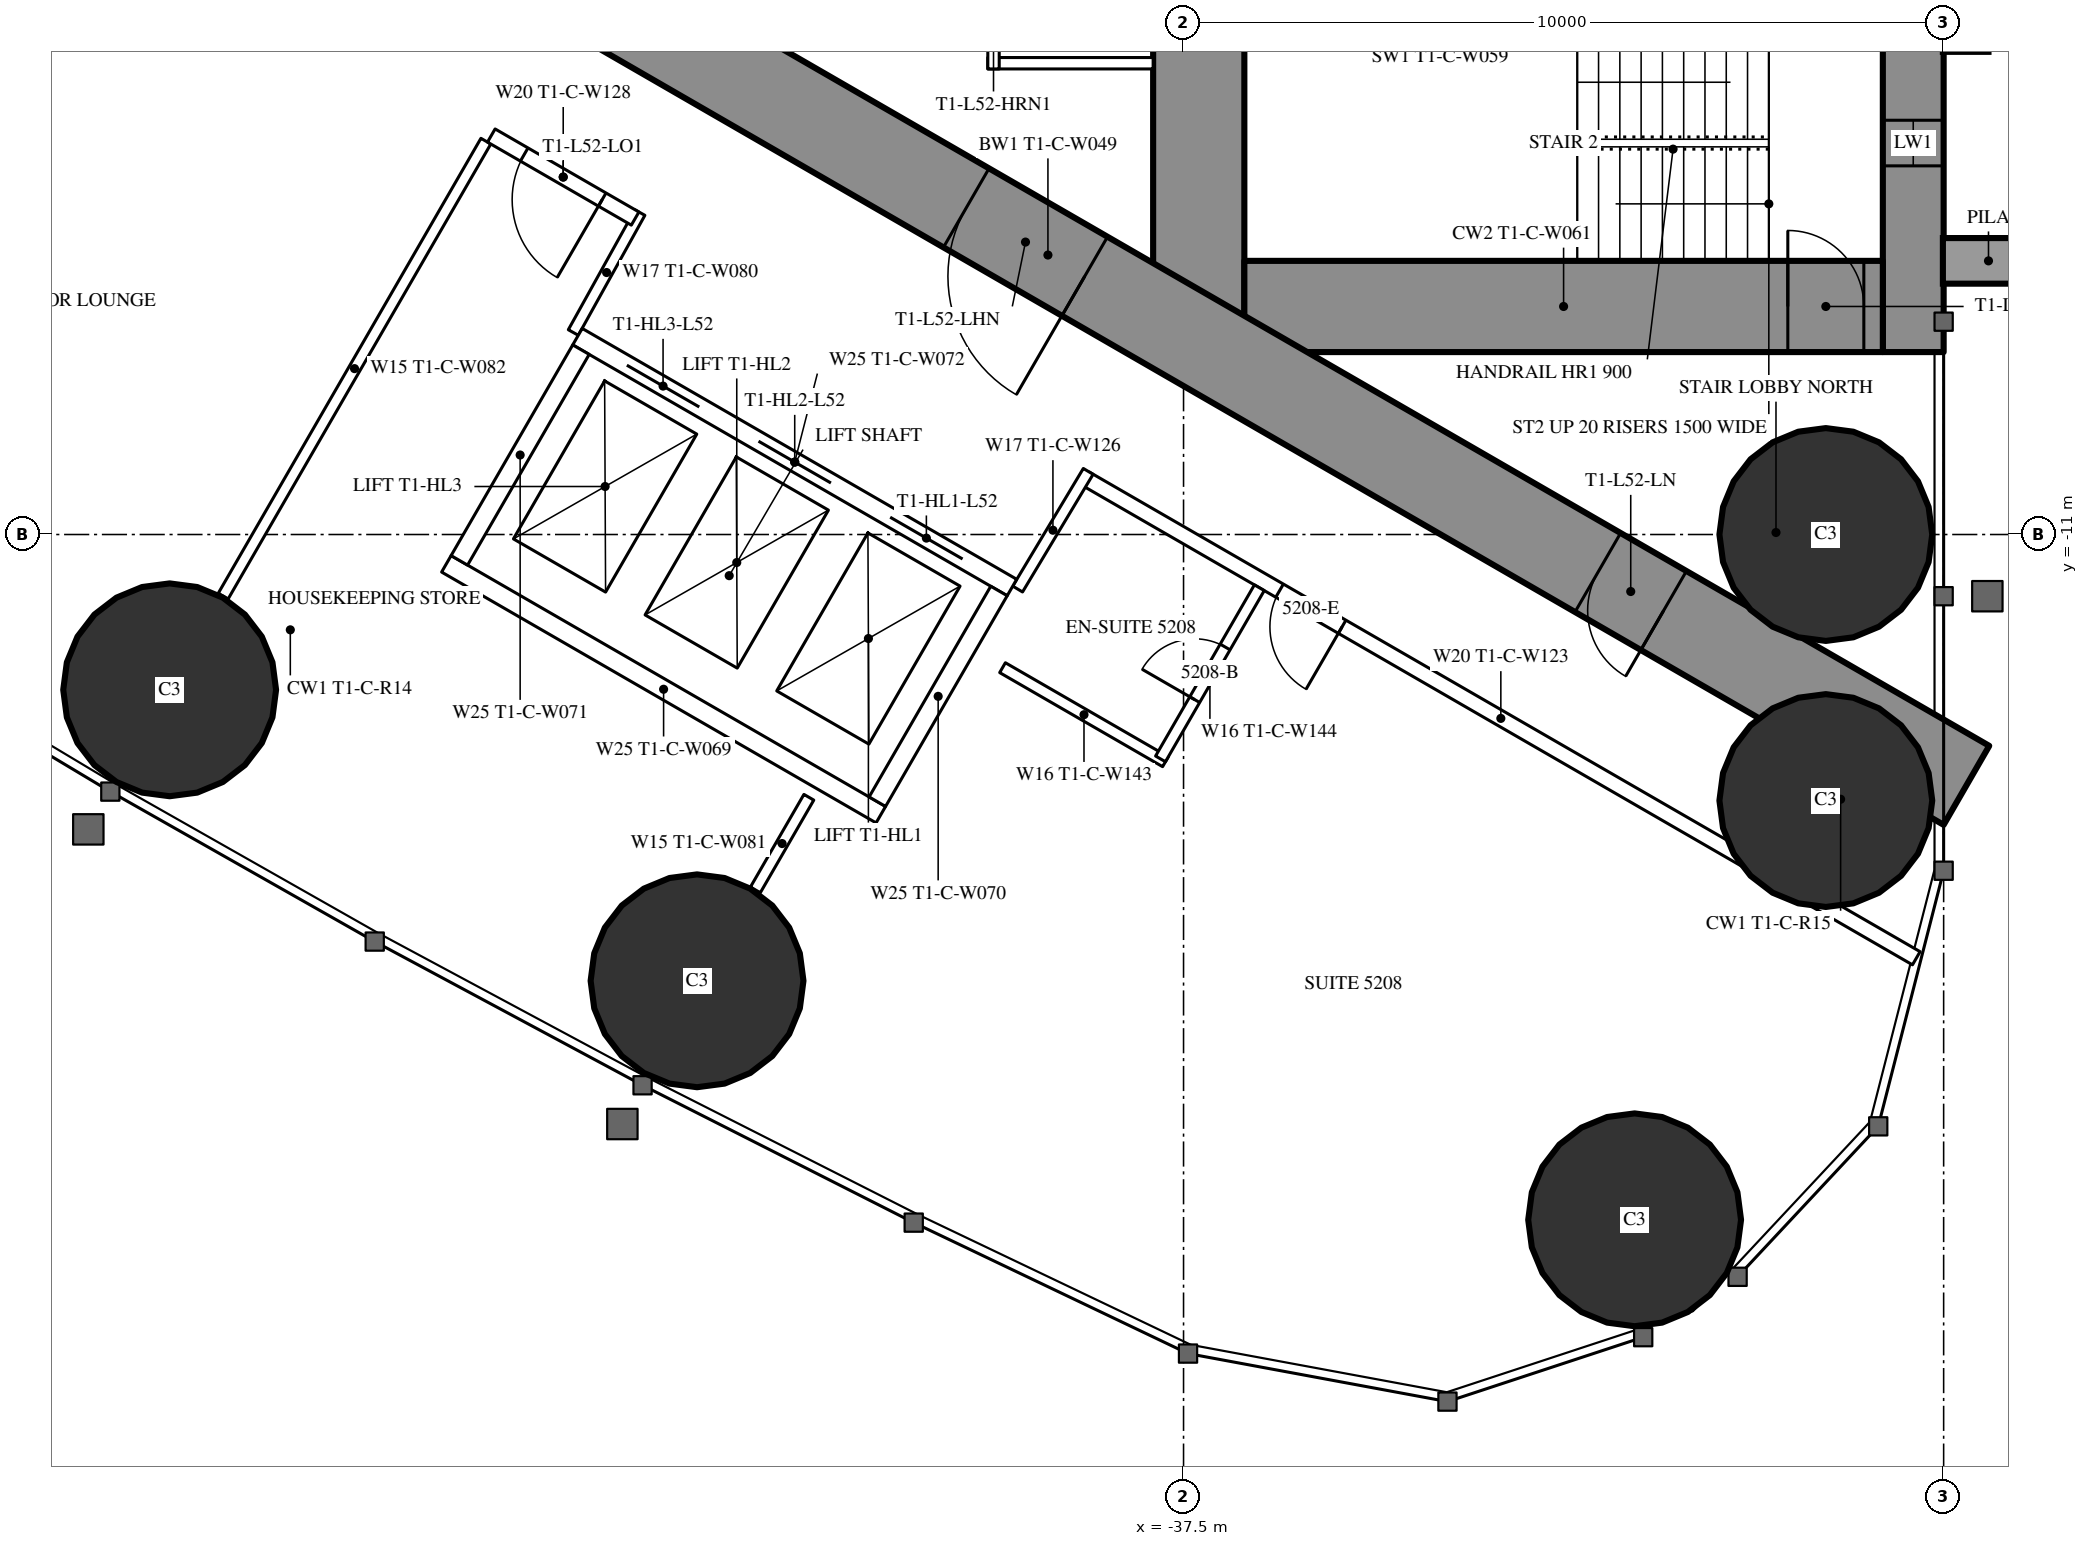
"""IFC4 building model, lengths in metres.
Left out: names, types, materials, properties, quantities, classifications, styles, units other than length and angle.
Written with IfcOpenShell. Run it as: python <this file> out.ifc"""

import sys

from ifc_helpers import new_model, si_unit, direction, frame, frame_2d, origin, origin_2d, place, context, subcontext, project, spatial, rectangle, circle, extrude, element, fill, save


model = new_model("IFC4")
c1 = context("Model", 3, precision=1e-05, world=origin(), true_north=direction((0.0, 1.0)))
c2 = subcontext(c1, "Body", "Model", "MODEL_VIEW")
j1 = project(units=[si_unit("LENGTHUNIT", "METRE"), si_unit("PLANEANGLEUNIT", "RADIAN")], contexts=[c1])
p1 = place(None, origin())
s1 = spatial("IfcSite", under=j1, at=p1, CompositionType="ELEMENT")
p2 = place(p1, origin())
s2 = spatial("IfcBuilding", under=s1, at=p2, CompositionType="ELEMENT")
p3 = place(p2, frame((0.0, 0.0, 194.8)))
s3 = spatial("IfcBuildingStorey", under=s2, at=p3, CompositionType="ELEMENT", Elevation=194.8)
for number, where, z_axis, x_axis in (
    (1, (-31.565, -20.016, 0.0), (0.0, 0.0, 1.0), (1.0, 0.0, 0.0)),
    (2, (-29.05, -11.0, 0.0), (0.0, 0.0, 1.0), (1.0, 0.0, 0.0)),
    (3, (-29.05, -14.5, 0.0), (0.0, 0.0, 1.0), (1.0, 0.0, 0.0)),
    (4, (-50.839, -13.043, 0.0), (0.0, 0.0, 1.0), (1.0, 0.0, 0.0)),
    (5, (-43.9, -16.871, 0.0), (0.0, 0.0, 1.0), (1.0, 0.0, 0.0)),
):
    element("IfcColumn", number, at=place(p3, frame(where, z_axis=z_axis, x_axis=x_axis)), inside=s3, PredefinedType="COLUMN", context=c2, shape_type="SweptSolid", body=[
        extrude(circle(Radius=1.4, at=origin_2d()), origin(), (0.0, 0.0, 1.0), 3.5),
    ])
p4 = place(p3, frame((-27.9, 8.6, 0.0), z_axis=(0.0, 0.0, 1.0), x_axis=(0.0, -1.0, 0.0)))
e6 = element("IfcWall", 6, at=p4, inside=s3, PredefinedType="SHEAR", context=c2, shape_type="SweptSolid", body=[
    extrude(rectangle(XDim=17.2, YDim=0.8, at=frame_2d((8.6, 0.0))), origin(), (0.0, 0.0, 1.0), 3.5),
])
p5 = place(p4, frame((2.45, 0.0, 0.6)))
e7 = element("IfcOpeningElement", 7, at=p5, cuts=e6, PredefinedType="OPENING", context=c2, shape_type="SweptSolid", body=[
    extrude(rectangle(XDim=0.6, YDim=2.1, at=frame_2d((0.3, 1.05))), frame((0.0, 0.41, 0.0), z_axis=(0.0, -1.0, 0.0), x_axis=(1.0, 0.0, 0.0)), (0.0, 0.0, 1.0), 0.82),
])
p6 = place(p4, frame((14.15, 0.0, 0.6)))
e8 = element("IfcOpeningElement", 8, at=p6, cuts=e6, PredefinedType="OPENING", context=c2, shape_type="SweptSolid", body=[
    extrude(rectangle(XDim=0.6, YDim=2.1, at=frame_2d((0.3, 1.05))), frame((0.0, 0.41, 0.0), z_axis=(0.0, -1.0, 0.0), x_axis=(1.0, 0.0, 0.0)), (0.0, 0.0, 1.0), 0.82),
])
p7 = place(p3, frame((-37.3, 8.6, 0.0), z_axis=(0.0, 0.0, 1.0), x_axis=(0.0, -1.0, 0.0)))
e9 = element("IfcWall", 9, at=p7, inside=s3, PredefinedType="SHEAR", context=c2, shape_type="SweptSolid", body=[
    extrude(rectangle(XDim=17.2, YDim=1.2, at=frame_2d((8.6, 0.0))), origin(), (0.0, 0.0, 1.0), 3.5),
])
p8 = place(p7, frame((7.7, 0.0, 0.0)))
e10 = element("IfcOpeningElement", 10, at=p8, cuts=e9, PredefinedType="OPENING", context=c2, shape_type="SweptSolid", body=[
    extrude(rectangle(XDim=1.8, YDim=2.2, at=frame_2d((0.9, 1.1))), frame((0.0, 0.61, 0.0), z_axis=(0.0, -1.0, 0.0), x_axis=(1.0, 0.0, 0.0)), (0.0, 0.0, 1.0), 1.22),
])
p9 = place(p3, frame((-28.3, -8.0, 0.0), z_axis=(0.0, 0.0, 1.0), x_axis=(-1.0, 0.0, 0.0)))
e11 = element("IfcWall", 11, at=p9, inside=s3, PredefinedType="SHEAR", context=c2, shape_type="SweptSolid", body=[
    extrude(rectangle(XDim=8.4, YDim=1.2, at=frame_2d((4.2, 0.0))), origin(), (0.0, 0.0, 1.0), 3.5),
])
p10 = place(p9, frame((0.25, 0.0, 0.0)))
e12 = element("IfcOpeningElement", 12, at=p10, cuts=e11, PredefinedType="OPENING", context=c2, shape_type="SweptSolid", body=[
    extrude(rectangle(XDim=1.0, YDim=2.2, at=frame_2d((0.5, 1.1))), frame((0.0, 0.61, 0.0), z_axis=(0.0, -1.0, 0.0), x_axis=(1.0, 0.0, 0.0)), (0.0, 0.0, 1.0), 1.22),
])
p11 = place(p3, frame((-27.2, -14.3, 0.0), z_axis=(0.0, 0.0, 1.0), x_axis=(-0.866024021859, 0.500002393557, 0.0)))
e13 = element("IfcWall", 13, at=p11, inside=s3, PredefinedType="SHEAR", context=c2, shape_type="SweptSolid", body=[
    extrude(rectangle(XDim=27.907, YDim=1.2, at=frame_2d((13.954, 0.0))), origin(), (0.0, 0.0, 1.0), 3.5),
])
p12 = place(p11, frame((4.6, 0.0, 0.0)))
e14 = element("IfcOpeningElement", 14, at=p12, cuts=e13, PredefinedType="OPENING", context=c2, shape_type="SweptSolid", body=[
    extrude(rectangle(XDim=1.0, YDim=2.2, at=frame_2d((0.5, 1.1))), frame((0.0, 0.61, 0.0), z_axis=(0.0, -1.0, 0.0), x_axis=(1.0, 0.0, 0.0)), (0.0, 0.0, 1.0), 1.22),
])
p13 = place(p11, frame((13.395, 0.0, 0.0)))
e15 = element("IfcOpeningElement", 15, at=p13, cuts=e13, PredefinedType="OPENING", context=c2, shape_type="SweptSolid", body=[
    extrude(rectangle(XDim=1.8, YDim=2.2, at=frame_2d((0.9, 1.1))), frame((0.0, 0.61, 0.0), z_axis=(0.0, -1.0, 0.0), x_axis=(1.0, 0.0, 0.0)), (0.0, 0.0, 1.0), 1.22),
])
p14 = place(p3, frame((-46.679, -5.825, 0.0), z_axis=(0.0, 0.0, 1.0), x_axis=(-0.500006839597, -0.866021454905, 0.0)))
e16 = element("IfcWall", 16, at=p14, inside=s3, PredefinedType="PARTITIONING", context=c2, shape_type="SweptSolid", body=[
    extrude(rectangle(XDim=6.911, YDim=0.15, at=frame_2d((3.456, 0.0))), origin(), (0.0, 0.0, 1.0), 2.3),
])
p15 = place(p3, frame((-42.429, -14.457, 0.0), z_axis=(0.0, 0.0, 1.0), x_axis=(-0.5000578829, -0.865991982497, 0.0)))
e17 = element("IfcWall", 17, at=p15, inside=s3, PredefinedType="PARTITIONING", context=c2, shape_type="SweptSolid", body=[
    extrude(rectangle(XDim=1.407, YDim=0.15, at=frame_2d((0.704, 0.0))), origin(), (0.0, 0.0, 1.0), 3.25),
])
p16 = place(p3, frame((-27.86, -16.575, 0.0), z_axis=(0.0, 0.0, 1.0), x_axis=(-0.866027756871, 0.499995924312, 0.0)))
e18 = element("IfcWall", 18, at=p16, inside=s3, PredefinedType="PARTITIONING", context=c2, shape_type="SweptSolid", body=[
    extrude(rectangle(XDim=12.622, YDim=0.2, at=frame_2d((6.311, 0.0))), origin(), (0.0, 0.0, 1.0), 3.25),
])
p17 = place(p16, frame((8.722, 0.0, 0.0)))
e19 = element("IfcOpeningElement", 19, at=p17, cuts=e18, PredefinedType="OPENING", context=c2, shape_type="SweptSolid", body=[
    extrude(rectangle(XDim=0.95, YDim=2.2, at=frame_2d((0.475, 1.1))), frame((0.0, 0.11, 0.0), z_axis=(0.0, -1.0, 0.0), x_axis=(1.0, 0.0, 0.0)), (0.0, 0.0, 1.0), 0.22),
])
for number, where, z_axis, x_axis in (
    (20, (-39.683, -11.718, 0.0), (0.0, 0.0, 1.0), (0.514, 0.858, 0.0)),
    (21, (-44.652, -6.764, 0.0), (0.0, 0.0, 1.0), (-0.485, -0.874, 0.0)),
):
    element("IfcWall", number, at=place(p3, frame(where, z_axis=z_axis, x_axis=x_axis)), inside=s3, PredefinedType="PARTITIONING", context=c2, shape_type="SweptSolid", body=[
        extrude(rectangle(XDim=1.805, YDim=0.15, at=frame_2d((0.903, 0.0))), origin(), (0.0, 0.0, 1.0), 3.25),
    ])
p18 = place(p3, frame((-44.715, -6.844, 0.0), z_axis=(0.0, 0.0, 1.0), x_axis=(-0.865999496279, 0.500044870432, 0.0)))
e22 = element("IfcWall", 22, at=p18, inside=s3, PredefinedType="PARTITIONING", context=c2, shape_type="SweptSolid", body=[
    extrude(rectangle(XDim=2.185, YDim=0.2, at=frame_2d((1.092, 0.0))), origin(), (0.0, 0.0, 1.0), 3.25),
])
p19 = place(p18, frame((0.5, 0.0, 0.0)))
e23 = element("IfcOpeningElement", 23, at=p19, cuts=e22, PredefinedType="OPENING", context=c2, shape_type="SweptSolid", body=[
    extrude(rectangle(XDim=1.185, YDim=2.2, at=frame_2d((0.593, 1.1))), frame((0.0, 0.11, 0.0), z_axis=(0.0, -1.0, 0.0), x_axis=(1.0, 0.0, 0.0)), (0.0, 0.0, 1.0), 0.22),
])
p20 = place(p3, frame((-37.738, -13.989, 0.0), z_axis=(0.0, 0.0, 1.0), x_axis=(-0.86604923931, 0.499958713387, 0.0)))
e24 = element("IfcWall", 24, at=p20, inside=s3, PredefinedType="PARTITIONING", context=c2, shape_type="SweptSolid", body=[
    extrude(rectangle(XDim=2.475, YDim=0.15, at=frame_2d((1.237, 0.0))), origin(), (0.0, 0.0, 1.0), 3.25),
])
p21 = place(p3, frame((-36.503, -11.7, 0.0), z_axis=(0.0, 0.0, 1.0), x_axis=(-0.500006934395, -0.866021400173, 0.0)))
e25 = element("IfcWall", 25, at=p21, inside=s3, PredefinedType="PARTITIONING", context=c2, shape_type="SweptSolid", body=[
    extrude(rectangle(XDim=2.6, YDim=0.15, at=frame_2d((1.3, 0.0))), origin(), (0.0, 0.0, 1.0), 3.25),
])
p22 = place(p21, frame((0.9, 0.0, 0.0)))
e26 = element("IfcOpeningElement", 26, at=p22, cuts=e25, PredefinedType="OPENING", context=c2, shape_type="SweptSolid", body=[
    extrude(rectangle(XDim=0.8, YDim=2.2, at=frame_2d((0.4, 1.1))), frame((0.0, 0.085, 0.0), z_axis=(0.0, -1.0, 0.0), x_axis=(1.0, 0.0, 0.0)), (0.0, 0.0, 1.0), 0.17),
])
p23 = place(p3, frame((-37.9, -4.8, 0.0), z_axis=(0.0, 0.0, 1.0), x_axis=(-1.0, 0.0, 0.0)))
e27 = element("IfcWall", 27, at=p23, inside=s3, PredefinedType="PARTITIONING", context=c2, shape_type="SweptSolid", body=[
    extrude(rectangle(XDim=2.175, YDim=0.15, at=frame_2d((1.087, 0.0))), origin(), (0.0, 0.0, 1.0), 3.25),
])
p24 = place(p3, frame((-40.0, -2.925, 0.0), z_axis=(0.0, 0.0, 1.0), x_axis=(0.0, -1.0, 0.0)))
e28 = element("IfcWall", 28, at=p24, inside=s3, PredefinedType="PARTITIONING", context=c2, shape_type="SweptSolid", body=[
    extrude(rectangle(XDim=1.95, YDim=0.15, at=frame_2d((0.975, 0.0))), origin(), (0.0, 0.0, 1.0), 3.25),
])
p25 = place(p24, frame((0.475, 0.0, 0.0)))
e29 = element("IfcOpeningElement", 29, at=p25, cuts=e28, PredefinedType="OPENING", context=c2, shape_type="SweptSolid", body=[
    extrude(rectangle(XDim=1.0, YDim=2.2, at=frame_2d((0.5, 1.1))), frame((0.0, 0.085, 0.0), z_axis=(0.0, -1.0, 0.0), x_axis=(1.0, 0.0, 0.0)), (0.0, 0.0, 1.0), 0.17),
])
p26 = place(p3, frame((-39.758, -11.697, 0.0), z_axis=(0.0, 0.0, 1.0), x_axis=(-0.866024194504, 0.500002094529, 0.0)))
e30 = element("IfcWall", 30, at=p26, inside=s3, PredefinedType="PARTITIONING", context=c2, shape_type="SweptSolid", body=[
    extrude(rectangle(XDim=6.6, YDim=0.25, at=frame_2d((3.3, 0.0))), origin(), (0.0, 0.0, 1.0), 3.25),
])
p27 = place(p26, frame((0.75, 0.0, 0.0)))
e31 = element("IfcOpeningElement", 31, at=p27, cuts=e30, PredefinedType="OPENING", context=c2, shape_type="SweptSolid", body=[
    extrude(rectangle(XDim=1.1, YDim=2.2, at=frame_2d((0.55, 1.1))), frame((0.0, 0.135, 0.0), z_axis=(0.0, -1.0, 0.0), x_axis=(1.0, 0.0, 0.0)), (0.0, 0.0, 1.0), 0.27),
])
p28 = place(p26, frame((2.75, 0.0, 0.0)))
e32 = element("IfcOpeningElement", 32, at=p28, cuts=e30, PredefinedType="OPENING", context=c2, shape_type="SweptSolid", body=[
    extrude(rectangle(XDim=1.1, YDim=2.2, at=frame_2d((0.55, 1.1))), frame((0.0, 0.135, 0.0), z_axis=(0.0, -1.0, 0.0), x_axis=(1.0, 0.0, 0.0)), (0.0, 0.0, 1.0), 0.27),
])
p29 = place(p26, frame((4.75, 0.0, 0.0)))
e33 = element("IfcOpeningElement", 33, at=p29, cuts=e30, PredefinedType="OPENING", context=c2, shape_type="SweptSolid", body=[
    extrude(rectangle(XDim=1.1, YDim=2.2, at=frame_2d((0.55, 1.1))), frame((0.0, 0.135, 0.0), z_axis=(0.0, -1.0, 0.0), x_axis=(1.0, 0.0, 0.0)), (0.0, 0.0, 1.0), 0.27),
])
p30 = place(p3, frame((-41.482, -14.686, 0.0), z_axis=(0.0, 0.0, 1.0), x_axis=(-0.86603344179, 0.499986077507, 0.0)))
e34 = element("IfcWall", 34, at=p30, inside=s3, PredefinedType="PARTITIONING", context=c2, shape_type="SweptSolid", body=[
    extrude(rectangle(XDim=6.6, YDim=0.25, at=frame_2d((3.3, 0.0))), origin(), (0.0, 0.0, 1.0), 3.25),
])
for number, where, z_axis, x_axis in (
    (35, (-39.928, -11.743, 0.0), (0.0, 0.0, 1.0), (-0.5, -0.866, 0.0)),
    (36, (-45.428, -8.568, 0.0), (0.0, 0.0, 1.0), (-0.5, -0.866, 0.0)),
):
    element("IfcWall", number, at=place(p3, frame(where, z_axis=z_axis, x_axis=x_axis)), inside=s3, PredefinedType="PARTITIONING", context=c2, shape_type="SweptSolid", body=[
        extrude(rectangle(XDim=3.201, YDim=0.25, at=frame_2d((1.6, 0.0))), origin(), (0.0, 0.0, 1.0), 3.25),
    ])
p31 = place(p22, origin())
e37 = element("IfcDoor", 37, at=p31, inside=s3, OperationType="SINGLE_SWING_RIGHT", PredefinedType="DOOR", context=c2, shape_type="SweptSolid", body=[
    extrude(rectangle(XDim=0.8, YDim=2.2, at=frame_2d((0.4, 1.1))), frame((0.0, 0.025, 0.0), z_axis=(0.0, -1.0, 0.0), x_axis=(1.0, 0.0, 0.0)), (0.0, 0.0, 1.0), 0.05),
])
fill(e26, e37)
p32 = place(p17, origin())
e38 = element("IfcDoor", 38, at=p32, inside=s3, OperationType="SINGLE_SWING_LEFT", PredefinedType="DOOR", context=c2, shape_type="SweptSolid", body=[
    extrude(rectangle(XDim=0.95, YDim=2.2, at=frame_2d((0.475, 1.1))), frame((0.0, 0.025, 0.0), z_axis=(0.0, -1.0, 0.0), x_axis=(1.0, 0.0, 0.0)), (0.0, 0.0, 1.0), 0.05),
])
fill(e19, e38)
p33 = place(p19, origin())
e39 = element("IfcDoor", 39, at=p33, inside=s3, OperationType="SINGLE_SWING_LEFT", PredefinedType="DOOR", context=c2, shape_type="SweptSolid", body=[
    extrude(rectangle(XDim=1.185, YDim=2.2, at=frame_2d((0.593, 1.1))), frame((0.0, 0.025, 0.0), z_axis=(0.0, -1.0, 0.0), x_axis=(1.0, 0.0, 0.0)), (0.0, 0.0, 1.0), 0.05),
])
fill(e23, e39)
p34 = place(p12, origin())
e40 = element("IfcDoor", 40, at=p34, inside=s3, OperationType="SINGLE_SWING_LEFT", PredefinedType="DOOR", context=c2, shape_type="SweptSolid", body=[
    extrude(rectangle(XDim=1.0, YDim=2.2, at=frame_2d((0.5, 1.1))), frame((0.0, 0.025, 0.0), z_axis=(0.0, -1.0, 0.0), x_axis=(1.0, 0.0, 0.0)), (0.0, 0.0, 1.0), 0.05),
])
fill(e14, e40)
p35 = place(p13, origin())
e41 = element("IfcDoor", 41, at=p35, inside=s3, OperationType="DOUBLE_DOOR_SINGLE_SWING", PredefinedType="DOOR", context=c2, shape_type="SweptSolid", body=[
    extrude(rectangle(XDim=1.8, YDim=2.2, at=frame_2d((0.9, 1.1))), frame((0.0, 0.025, 0.0), z_axis=(0.0, -1.0, 0.0), x_axis=(1.0, 0.0, 0.0)), (0.0, 0.0, 1.0), 0.05),
])
fill(e15, e41)
p36 = place(p10, origin())
e42 = element("IfcDoor", 42, at=p36, inside=s3, OperationType="SINGLE_SWING_RIGHT", PredefinedType="DOOR", context=c2, shape_type="SweptSolid", body=[
    extrude(rectangle(XDim=1.0, YDim=2.2, at=frame_2d((0.5, 1.1))), frame((0.0, 0.025, 0.0), z_axis=(0.0, -1.0, 0.0), x_axis=(1.0, 0.0, 0.0)), (0.0, 0.0, 1.0), 0.05),
])
fill(e12, e42)
p37 = place(p27, origin())
e43 = element("IfcDoor", 43, at=p37, inside=s3, OperationType="DOUBLE_DOOR_SLIDING", PredefinedType="USERDEFINED", context=c2, shape_type="SweptSolid", body=[
    extrude(rectangle(XDim=1.1, YDim=2.2, at=frame_2d((0.55, 1.1))), frame((0.0, 0.025, 0.0), z_axis=(0.0, -1.0, 0.0), x_axis=(1.0, 0.0, 0.0)), (0.0, 0.0, 1.0), 0.05),
])
fill(e31, e43)
p38 = place(p28, origin())
e44 = element("IfcDoor", 44, at=p38, inside=s3, OperationType="DOUBLE_DOOR_SLIDING", PredefinedType="USERDEFINED", context=c2, shape_type="SweptSolid", body=[
    extrude(rectangle(XDim=1.1, YDim=2.2, at=frame_2d((0.55, 1.1))), frame((0.0, 0.025, 0.0), z_axis=(0.0, -1.0, 0.0), x_axis=(1.0, 0.0, 0.0)), (0.0, 0.0, 1.0), 0.05),
])
fill(e32, e44)
p39 = place(p29, origin())
e45 = element("IfcDoor", 45, at=p39, inside=s3, OperationType="DOUBLE_DOOR_SLIDING", PredefinedType="USERDEFINED", context=c2, shape_type="SweptSolid", body=[
    extrude(rectangle(XDim=1.1, YDim=2.2, at=frame_2d((0.55, 1.1))), frame((0.0, 0.025, 0.0), z_axis=(0.0, -1.0, 0.0), x_axis=(1.0, 0.0, 0.0)), (0.0, 0.0, 1.0), 0.05),
])
fill(e33, e45)
p40 = place(p6, origin())
e46 = element("IfcWindow", 46, at=p40, inside=s3, PartitioningType="SINGLE_PANEL", PredefinedType="WINDOW", context=c2, shape_type="SweptSolid", body=[
    extrude(rectangle(XDim=0.6, YDim=2.1, at=frame_2d((0.3, 1.05))), frame((0.0, 0.03, 0.0), z_axis=(0.0, -1.0, 0.0), x_axis=(1.0, 0.0, 0.0)), (0.0, 0.0, 1.0), 0.06),
])
fill(e8, e46)
save(model, sys.argv[1])
